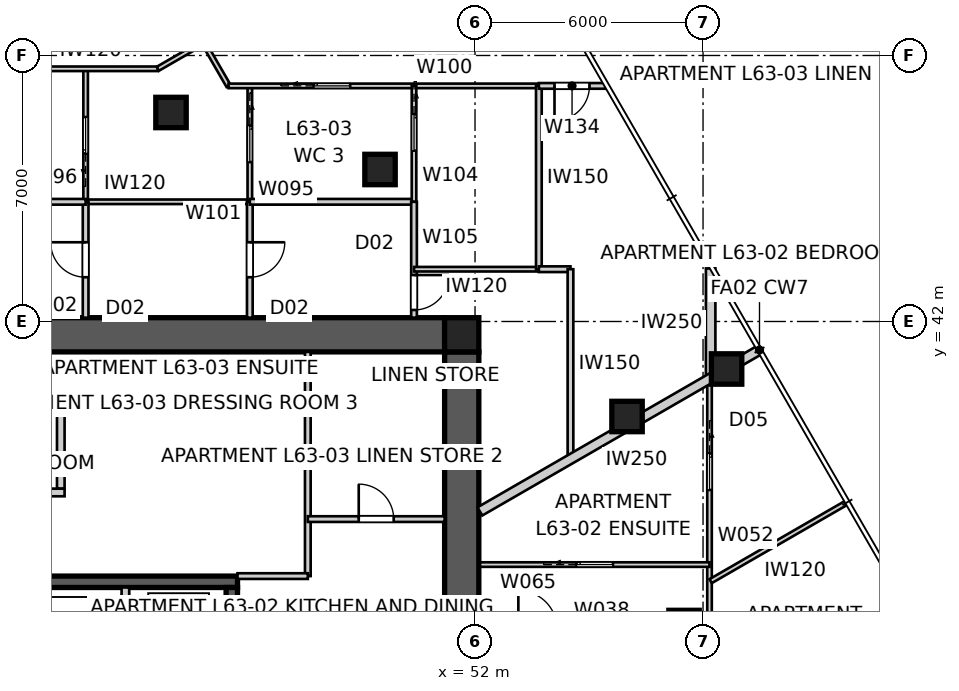
"""IFC4 building model, lengths in metres.
Left out: names, types, materials, properties, quantities, classifications, styles, units other than length and angle.
Written with IfcOpenShell. Run it as: python <this file> out.ifc"""

import sys

from ifc_helpers import new_model, si_unit, direction, frame, frame_2d, origin, origin_2d, place, context, subcontext, project, spatial, polyline, rectangle, outline, extrude, element, fill, save


model = new_model("IFC4")
c1 = context("Model", 3, precision=1e-05, world=origin(), true_north=direction((0.0, 1.0)))
c2 = subcontext(c1, "Body", "Model", "MODEL_VIEW")
j1 = project(units=[si_unit("LENGTHUNIT", "METRE"), si_unit("PLANEANGLEUNIT", "RADIAN")], contexts=[c1])
p1 = place(None, origin())
s1 = spatial("IfcSite", under=j1, at=p1, CompositionType="ELEMENT")
p2 = place(p1, origin())
s2 = spatial("IfcBuilding", under=s1, at=p2, CompositionType="ELEMENT")
p3 = place(p2, frame((0.0, 0.0, 228.6)))
s3 = spatial("IfcBuildingStorey", under=s2, at=p3, CompositionType="ELEMENT", Elevation=228.6)
p4 = place(p3, frame((28.8, 41.65, 0.0), z_axis=(0.0, 0.0, 1.0), x_axis=(1.0, 0.0, 0.0)))
e1 = element("IfcWall", 1, at=p4, inside=s3, PredefinedType="SHEAR", context=c2, shape_type="SweptSolid", body=[
    extrude(outline(polyline([(0.0, -0.45), (22.4, -0.45), (22.4, -0.025), (22.85, -0.025), (22.85, 0.025), (22.4, 0.025), (22.4, 0.45), (0.0, 0.45), (0.0, 0.025), (-0.45, 0.025), (-0.45, -0.025), (0.0, -0.025), (0.0, -0.45)])), origin(), (0.0, 0.0, 1.0), 3.4),
])
p5 = place(p3, frame((51.65, 18.8, 0.0), z_axis=(0.0, 0.0, 1.0), x_axis=(0.0, 1.0, 0.0)))
e2 = element("IfcWall", 2, at=p5, inside=s3, PredefinedType="SHEAR", context=c2, shape_type="SweptSolid", body=[
    extrude(outline(polyline([(0.0, -0.45), (22.4, -0.45), (22.4, -0.025), (22.85, -0.025), (22.85, 0.025), (22.4, 0.025), (22.4, 0.45), (0.0, 0.45), (0.0, 0.025), (-0.45, 0.025), (-0.45, -0.025), (0.0, -0.025), (0.0, -0.45)])), origin(), (0.0, 0.0, 1.0), 3.4),
])
p6 = place(p5, frame((11.14, 0.0, 0.0)))
e3 = element("IfcOpeningElement", 3, at=p6, cuts=e2, PredefinedType="OPENING", context=c2, shape_type="SweptSolid", body=[
    extrude(rectangle(XDim=1.02, YDim=2.4, at=frame_2d((0.51, 1.2))), frame((0.0, 0.46, 0.0), z_axis=(0.0, -1.0, 0.0), x_axis=(1.0, 0.0, 0.0)), (0.0, 0.0, 1.0), 0.92),
])
p7 = place(p3, frame((34.25, 35.15, 0.0), z_axis=(0.0, 0.0, 1.0), x_axis=(1.0, 0.0, 0.0)))
e4 = element("IfcWall", 4, at=p7, inside=s3, PredefinedType="SHEAR", context=c2, shape_type="SweptSolid", body=[
    extrude(rectangle(XDim=11.5, YDim=0.3, at=frame_2d((5.75, 0.0))), origin(), (0.0, 0.0, 1.0), 3.4),
])
p8 = place(p3, frame((42.8, 32.2, 0.0), z_axis=(0.0, 0.0, 1.0), x_axis=(0.0, 1.0, 0.0)))
e5 = element("IfcWall", 5, at=p8, inside=s3, PredefinedType="SOLIDWALL", context=c2, shape_type="SweptSolid", body=[
    extrude(rectangle(XDim=2.8, YDim=0.2, at=frame_2d((1.4, 0.0))), origin(), (0.0, 0.0, 1.0), 3.4),
])
p9 = place(p3, frame((45.6, 32.2, 0.0), z_axis=(0.0, 0.0, 1.0), x_axis=(0.0, 1.0, 0.0)))
e6 = element("IfcWall", 6, at=p9, inside=s3, PredefinedType="SHEAR", context=c2, shape_type="SweptSolid", body=[
    extrude(rectangle(XDim=2.8, YDim=0.3, at=frame_2d((1.4, 0.0))), origin(), (0.0, 0.0, 1.0), 3.4),
])
p10 = place(p3, frame((41.1, 37.6, 0.0), z_axis=(0.0, 0.0, 1.0), x_axis=(0.0, 1.0, 0.0)))
e7 = element("IfcWall", 7, at=p10, inside=s3, PredefinedType="SOLIDWALL", context=c2, shape_type="SweptSolid", body=[
    extrude(rectangle(XDim=2.0, YDim=0.2, at=frame_2d((1.0, 0.0))), origin(), (0.0, 0.0, 1.0), 3.4),
])
for number, where, z_axis, x_axis in (
    (8, (38.8, 37.5, 0.0), (0.0, 0.0, 1.0), (1.0, 0.0, 0.0)),
    (9, (38.8, 39.7, 0.0), (0.0, 0.0, 1.0), (1.0, 0.0, 0.0)),
):
    element("IfcWall", number, at=place(p3, frame(where, z_axis=z_axis, x_axis=x_axis)), inside=s3, PredefinedType="SOLIDWALL", context=c2, shape_type="SweptSolid", body=[
        extrude(rectangle(XDim=2.4, YDim=0.2, at=frame_2d((1.2, 0.0))), origin(), (0.0, 0.0, 1.0), 3.4),
    ])
p11 = place(p3, frame((51.65, 41.65, 0.0), z_axis=(0.0, 0.0, 1.0), x_axis=(1.0, 0.0, 0.0)))
e10 = element("IfcColumn", 10, at=p11, inside=s3, PredefinedType="COLUMN", context=c2, shape_type="SweptSolid", body=[
    extrude(rectangle(XDim=0.9, YDim=0.9, at=origin_2d()), origin(), (0.0, 0.0, 1.0), 3.4),
])
for number, where, z_axis, x_axis in (
    (11, (58.62, 40.75, 0.0), (0.0, 0.0, 1.0), (1.0, 0.0, 0.0)),
    (12, (57.5, 34.0, 0.0), (0.0, 0.0, 1.0), (1.0, 0.0, 0.0)),
    (13, (56.0, 39.5, 0.0), (0.0, 0.0, 1.0), (1.0, 0.0, 0.0)),
    (14, (49.5, 46.0, 0.0), (0.0, 0.0, 1.0), (1.0, 0.0, 0.0)),
    (15, (44.0, 47.5, 0.0), (0.0, 0.0, 1.0), (1.0, 0.0, 0.0)),
):
    element("IfcColumn", number, at=place(p3, frame(where, z_axis=z_axis, x_axis=x_axis)), inside=s3, PredefinedType="COLUMN", context=c2, shape_type="SweptSolid", body=[
        extrude(rectangle(XDim=0.8, YDim=0.8, at=origin_2d()), origin(), (0.0, 0.0, 1.0), 3.4),
    ])
p12 = place(p3, frame((59.486, 41.25, 0.0), z_axis=(0.0, 0.0, 1.0), x_axis=(-0.866020489494, -0.500008511703, 0.0)))
e16 = element("IfcWall", 16, at=p12, inside=s3, PredefinedType="PARTITIONING", context=c2, shape_type="SweptSolid", body=[
    extrude(rectangle(XDim=8.496, YDim=0.25, at=frame_2d((4.248, 0.0))), origin(), (0.0, 0.0, 1.0), 3.25),
])
p13 = place(p3, frame((47.6, 41.2, 0.0), z_axis=(0.0, 0.0, 1.0), x_axis=(0.0, -1.0, 0.0)))
e17 = element("IfcWall", 17, at=p13, inside=s3, PredefinedType="SOLIDWALL", context=c2, shape_type="SweptSolid", body=[
    extrude(rectangle(XDim=5.9, YDim=0.15, at=frame_2d((2.95, 0.0))), origin(), (0.0, 0.0, 1.0), 3.25),
])
p14 = place(p3, frame((47.6, 35.3, 0.0), z_axis=(0.0, 0.0, 1.0), x_axis=(-1.0, 0.0, 0.0)))
e18 = element("IfcWall", 18, at=p14, inside=s3, PredefinedType="SOLIDWALL", context=c2, shape_type="SweptSolid", body=[
    extrude(rectangle(XDim=1.85, YDim=0.15, at=frame_2d((0.925, 0.0))), origin(), (0.0, 0.0, 1.0), 3.25),
])
p15 = place(p3, frame((47.6, 36.8, 0.0), z_axis=(0.0, 0.0, 1.0), x_axis=(1.0, 0.0, 0.0)))
e19 = element("IfcWall", 19, at=p15, inside=s3, PredefinedType="SOLIDWALL", context=c2, shape_type="SweptSolid", body=[
    extrude(rectangle(XDim=3.6, YDim=0.15, at=frame_2d((1.8, 0.0))), origin(), (0.0, 0.0, 1.0), 3.25),
])
p16 = place(p15, frame((1.34, 0.0, 0.0)))
e20 = element("IfcOpeningElement", 20, at=p16, cuts=e19, PredefinedType="OPENING", context=c2, shape_type="SweptSolid", body=[
    extrude(rectangle(XDim=0.92, YDim=2.1, at=frame_2d((0.46, 1.05))), frame((0.0, 0.085, 0.0), z_axis=(0.0, -1.0, 0.0), x_axis=(1.0, 0.0, 0.0)), (0.0, 0.0, 1.0), 0.17),
])
p17 = place(p3, frame((58.171, 40.491, 0.0), z_axis=(0.0, 0.0, 1.0), x_axis=(-5.1455328e-05, -0.999999998676, 0.0)))
e21 = element("IfcWall", 21, at=p17, inside=s3, PredefinedType="PARTITIONING", context=c2, shape_type="SweptSolid", body=[
    extrude(rectangle(XDim=14.234, YDim=0.12, at=frame_2d((7.117, 0.0))), origin(), (0.0, 0.0, 1.0), 3.25),
])
p18 = place(p17, frame((6.932, 0.0, 0.0)))
e22 = element("IfcOpeningElement", 22, at=p18, cuts=e21, PredefinedType="OPENING", context=c2, shape_type="SweptSolid", body=[
    extrude(rectangle(XDim=0.92, YDim=2.34, at=frame_2d((0.46, 1.17))), frame((0.0, 0.07, 0.0), z_axis=(0.0, -1.0, 0.0), x_axis=(1.0, 0.0, 0.0)), (0.0, 0.0, 1.0), 0.14),
])
p19 = place(p17, frame((11.829, 0.0, 0.0)))
e23 = element("IfcOpeningElement", 23, at=p19, cuts=e21, PredefinedType="OPENING", context=c2, shape_type="SweptSolid", body=[
    extrude(rectangle(XDim=0.96, YDim=2.1, at=frame_2d((0.48, 1.05))), frame((0.0, 0.07, 0.0), z_axis=(0.0, -1.0, 0.0), x_axis=(1.0, 0.0, 0.0)), (0.0, 0.0, 1.0), 0.14),
])
p20 = place(p17, frame((1.964, 0.0, 0.0)))
e24 = element("IfcOpeningElement", 24, at=p20, cuts=e21, PredefinedType="OPENING", context=c2, shape_type="SweptSolid", body=[
    extrude(rectangle(XDim=0.96, YDim=2.1, at=frame_2d((0.48, 1.05))), frame((0.0, 0.07, 0.0), z_axis=(0.0, -1.0, 0.0), x_axis=(1.0, 0.0, 0.0)), (0.0, 0.0, 1.0), 0.14),
])
p21 = place(p3, frame((52.13, 35.603, 0.0), z_axis=(0.0, 0.0, 1.0), x_axis=(1.0, 0.0, 0.0)))
e25 = element("IfcWall", 25, at=p21, inside=s3, PredefinedType="PARTITIONING", context=c2, shape_type="SweptSolid", body=[
    extrude(rectangle(XDim=6.04, YDim=0.12, at=frame_2d((3.02, 0.0))), origin(), (0.0, 0.0, 1.0), 3.25),
])
p22 = place(p21, frame((2.54, 0.0, 0.0)))
e26 = element("IfcOpeningElement", 26, at=p22, cuts=e25, PredefinedType="OPENING", context=c2, shape_type="SweptSolid", body=[
    extrude(rectangle(XDim=0.96, YDim=2.1, at=frame_2d((0.48, 1.05))), frame((0.0, 0.07, 0.0), z_axis=(0.0, -1.0, 0.0), x_axis=(1.0, 0.0, 0.0)), (0.0, 0.0, 1.0), 0.14),
])
p23 = place(p3, frame((58.2, 35.167, 0.0), z_axis=(0.0, 0.0, 1.0), x_axis=(0.866025520146, 0.499999798456, 0.0)))
e27 = element("IfcWall", 27, at=p23, inside=s3, PredefinedType="PARTITIONING", context=c2, shape_type="SweptSolid", body=[
    extrude(rectangle(XDim=4.115, YDim=0.12, at=frame_2d((2.057, 0.0))), origin(), (0.0, 0.0, 1.0), 3.25),
])
p24 = place(p3, frame((58.2, 40.525, 0.0), z_axis=(0.0, 0.0, 1.0), x_axis=(0.0, 1.0, 0.0)))
e28 = element("IfcWall", 28, at=p24, inside=s3, PredefinedType="PARTITIONING", context=c2, shape_type="SweptSolid", body=[
    extrude(rectangle(XDim=2.872, YDim=0.25, at=frame_2d((1.436, 0.0))), origin(), (0.0, 0.0, 1.0), 3.25),
])
p25 = place(p3, frame((46.074, 45.15, 0.0), z_axis=(0.0, 0.0, 1.0), x_axis=(-1.0, 0.0, 0.0)))
e29 = element("IfcWall", 29, at=p25, inside=s3, PredefinedType="PARTITIONING", context=c2, shape_type="SweptSolid", body=[
    extrude(rectangle(XDim=4.321, YDim=0.12, at=frame_2d((2.16, 0.0))), origin(), (0.0, 0.0, 1.0), 3.25),
])
p26 = place(p3, frame((46.074, 48.2, 0.0), z_axis=(0.0, 0.0, 1.0), x_axis=(0.0, -1.0, 0.0)))
e30 = element("IfcWall", 30, at=p26, inside=s3, PredefinedType="PARTITIONING", context=c2, shape_type="SweptSolid", body=[
    extrude(rectangle(XDim=3.05, YDim=0.12, at=frame_2d((1.525, 0.0))), origin(), (0.0, 0.0, 1.0), 3.25),
])
p27 = place(p26, frame((1.045, 0.0, 0.0)))
e31 = element("IfcOpeningElement", 31, at=p27, cuts=e30, PredefinedType="OPENING", context=c2, shape_type="SweptSolid", body=[
    extrude(rectangle(XDim=0.96, YDim=2.1, at=frame_2d((0.48, 1.05))), frame((0.0, 0.07, 0.0), z_axis=(0.0, -1.0, 0.0), x_axis=(1.0, 0.0, 0.0)), (0.0, 0.0, 1.0), 0.14),
])
p28 = place(p3, frame((41.753, 45.15, 0.0), z_axis=(0.0, 0.0, 1.0), x_axis=(0.0, 1.0, 0.0)))
e32 = element("IfcWall", 32, at=p28, inside=s3, PredefinedType="PARTITIONING", context=c2, shape_type="SweptSolid", body=[
    extrude(rectangle(XDim=3.5, YDim=0.12, at=frame_2d((1.75, 0.0))), origin(), (0.0, 0.0, 1.0), 3.25),
])
p29 = place(p28, frame((1.27, 0.0, 0.0)))
e33 = element("IfcOpeningElement", 33, at=p29, cuts=e32, PredefinedType="OPENING", context=c2, shape_type="SweptSolid", body=[
    extrude(rectangle(XDim=0.96, YDim=2.1, at=frame_2d((0.48, 1.05))), frame((0.0, 0.07, 0.0), z_axis=(0.0, -1.0, 0.0), x_axis=(1.0, 0.0, 0.0)), (0.0, 0.0, 1.0), 0.14),
])
p30 = place(p3, frame((40.123, 48.65, 0.0), z_axis=(0.0, 0.0, 1.0), x_axis=(1.0, 0.0, 0.0)))
e34 = element("IfcWall", 34, at=p30, inside=s3, PredefinedType="PARTITIONING", context=c2, shape_type="SweptSolid", body=[
    extrude(rectangle(XDim=3.53, YDim=0.12, at=frame_2d((1.765, 0.0))), origin(), (0.0, 0.0, 1.0), 3.25),
])
p31 = place(p3, frame((43.653, 48.65, 0.0), z_axis=(0.0, 0.0, 1.0), x_axis=(0.865980246016, 0.500078207394, 0.0)))
e35 = element("IfcWall", 35, at=p31, inside=s3, PredefinedType="PARTITIONING", context=c2, shape_type="SweptSolid", body=[
    extrude(rectangle(XDim=1.346, YDim=0.12, at=frame_2d((0.673, 0.0))), origin(), (0.0, 0.0, 1.0), 3.25),
])
p32 = place(p3, frame((40.786, 56.388, 0.0), z_axis=(0.0, 0.0, 1.0), x_axis=(0.49999364752, -0.86602907136, 0.0)))
e36 = element("IfcWall", 36, at=p32, inside=s3, PredefinedType="PARTITIONING", context=c2, shape_type="SweptSolid", body=[
    extrude(rectangle(XDim=9.455, YDim=0.12, at=frame_2d((4.728, 0.0))), origin(), (0.0, 0.0, 1.0), 3.25),
])
p33 = place(p32, frame((1.681, 0.0, 0.0)))
e37 = element("IfcOpeningElement", 37, at=p33, cuts=e36, PredefinedType="OPENING", context=c2, shape_type="SweptSolid", body=[
    extrude(rectangle(XDim=0.92, YDim=2.34, at=frame_2d((0.46, 1.17))), frame((0.0, 0.07, 0.0), z_axis=(0.0, -1.0, 0.0), x_axis=(1.0, 0.0, 0.0)), (0.0, 0.0, 1.0), 0.14),
])
p34 = place(p32, frame((5.726, 0.0, 0.0)))
e38 = element("IfcOpeningElement", 38, at=p34, cuts=e36, PredefinedType="OPENING", context=c2, shape_type="SweptSolid", body=[
    extrude(rectangle(XDim=0.92, YDim=2.34, at=frame_2d((0.46, 1.17))), frame((0.0, 0.07, 0.0), z_axis=(0.0, -1.0, 0.0), x_axis=(1.0, 0.0, 0.0)), (0.0, 0.0, 1.0), 0.14),
])
p35 = place(p3, frame((45.514, 48.2, 0.0), z_axis=(0.0, 0.0, 1.0), x_axis=(1.0, 0.0, 0.0)))
e39 = element("IfcWall", 39, at=p35, inside=s3, PredefinedType="PARTITIONING", context=c2, shape_type="SweptSolid", body=[
    extrude(rectangle(XDim=8.166, YDim=0.12, at=frame_2d((4.083, 0.0))), origin(), (0.0, 0.0, 1.0), 3.25),
])
p36 = place(p35, frame((2.241, 0.0, 0.0)))
e40 = element("IfcOpeningElement", 40, at=p36, cuts=e39, PredefinedType="OPENING", context=c2, shape_type="SweptSolid", body=[
    extrude(rectangle(XDim=0.96, YDim=2.1, at=frame_2d((0.48, 1.05))), frame((0.0, 0.07, 0.0), z_axis=(0.0, -1.0, 0.0), x_axis=(1.0, 0.0, 0.0)), (0.0, 0.0, 1.0), 0.14),
])
p37 = place(p3, frame((46.074, 45.15, 0.0), z_axis=(0.0, 0.0, 1.0), x_axis=(0.0, -1.0, 0.0)))
e41 = element("IfcWall", 41, at=p37, inside=s3, PredefinedType="SOLIDWALL", context=c2, shape_type="SweptSolid", body=[
    extrude(rectangle(XDim=3.05, YDim=0.15, at=frame_2d((1.525, 0.0))), origin(), (0.0, 0.0, 1.0), 3.25),
])
p38 = place(p37, frame((1.065, 0.0, 0.0)))
e42 = element("IfcOpeningElement", 42, at=p38, cuts=e41, PredefinedType="OPENING", context=c2, shape_type="SweptSolid", body=[
    extrude(rectangle(XDim=0.92, YDim=2.34, at=frame_2d((0.46, 1.17))), frame((0.0, 0.085, 0.0), z_axis=(0.0, -1.0, 0.0), x_axis=(1.0, 0.0, 0.0)), (0.0, 0.0, 1.0), 0.17),
])
p39 = place(p3, frame((41.753, 42.1, 0.0), z_axis=(0.0, 0.0, 1.0), x_axis=(0.0, 1.0, 0.0)))
e43 = element("IfcWall", 43, at=p39, inside=s3, PredefinedType="SOLIDWALL", context=c2, shape_type="SweptSolid", body=[
    extrude(rectangle(XDim=3.05, YDim=0.15, at=frame_2d((1.525, 0.0))), origin(), (0.0, 0.0, 1.0), 3.25),
])
p40 = place(p39, frame((1.065, 0.0, 0.0)))
e44 = element("IfcOpeningElement", 44, at=p40, cuts=e43, PredefinedType="OPENING", context=c2, shape_type="SweptSolid", body=[
    extrude(rectangle(XDim=0.92, YDim=2.34, at=frame_2d((0.46, 1.17))), frame((0.0, 0.085, 0.0), z_axis=(0.0, -1.0, 0.0), x_axis=(1.0, 0.0, 0.0)), (0.0, 0.0, 1.0), 0.17),
])
p41 = place(p3, frame((50.395, 45.15, 0.0), z_axis=(0.0, 0.0, 1.0), x_axis=(-1.0, 0.0, 0.0)))
e45 = element("IfcWall", 45, at=p41, inside=s3, PredefinedType="SOLIDWALL", context=c2, shape_type="SweptSolid", body=[
    extrude(rectangle(XDim=4.321, YDim=0.15, at=frame_2d((2.16, 0.0))), origin(), (0.0, 0.0, 1.0), 3.25),
])
p42 = place(p3, frame((50.395, 48.2, 0.0), z_axis=(0.0, 0.0, 1.0), x_axis=(0.0, -1.0, 0.0)))
e46 = element("IfcWall", 46, at=p42, inside=s3, PredefinedType="PARTITIONING", context=c2, shape_type="SweptSolid", body=[
    extrude(rectangle(XDim=3.05, YDim=0.12, at=frame_2d((1.525, 0.0))), origin(), (0.0, 0.0, 1.0), 3.25),
])
p43 = place(p42, frame((0.745, 0.0, 0.0)))
e47 = element("IfcOpeningElement", 47, at=p43, cuts=e46, PredefinedType="OPENING", context=c2, shape_type="SweptSolid", body=[
    extrude(rectangle(XDim=0.96, YDim=2.1, at=frame_2d((0.48, 1.05))), frame((0.0, 0.07, 0.0), z_axis=(0.0, -1.0, 0.0), x_axis=(1.0, 0.0, 0.0)), (0.0, 0.0, 1.0), 0.14),
])
p44 = place(p3, frame((50.395, 45.15, 0.0), z_axis=(0.0, 0.0, 1.0), x_axis=(0.0, -1.0, 0.0)))
e48 = element("IfcWall", 48, at=p44, inside=s3, PredefinedType="SOLIDWALL", context=c2, shape_type="SweptSolid", body=[
    extrude(rectangle(XDim=3.05, YDim=0.15, at=frame_2d((1.525, 0.0))), origin(), (0.0, 0.0, 1.0), 3.25),
])
p45 = place(p44, frame((1.927, 0.0, 0.0)))
e49 = element("IfcOpeningElement", 49, at=p45, cuts=e48, PredefinedType="OPENING", context=c2, shape_type="SweptSolid", body=[
    extrude(rectangle(XDim=0.92, YDim=2.34, at=frame_2d((0.46, 1.17))), frame((0.0, 0.085, 0.0), z_axis=(0.0, -1.0, 0.0), x_axis=(1.0, 0.0, 0.0)), (0.0, 0.0, 1.0), 0.17),
])
p46 = place(p3, frame((53.68, 43.376, 0.0), z_axis=(0.0, 0.0, 1.0), x_axis=(-1.0, 0.0, 0.0)))
e50 = element("IfcWall", 50, at=p46, inside=s3, PredefinedType="PARTITIONING", context=c2, shape_type="SweptSolid", body=[
    extrude(rectangle(XDim=3.285, YDim=0.12, at=frame_2d((1.643, 0.0))), origin(), (0.0, 0.0, 1.0), 3.25),
])
p47 = place(p3, frame((53.68, 48.2, 0.0), z_axis=(0.0, 0.0, 1.0), x_axis=(0.0, -1.0, 0.0)))
e51 = element("IfcWall", 51, at=p47, inside=s3, PredefinedType="SOLIDWALL", context=c2, shape_type="SweptSolid", body=[
    extrude(rectangle(XDim=4.824, YDim=0.15, at=frame_2d((2.412, 0.0))), origin(), (0.0, 0.0, 1.0), 3.25),
])
p48 = place(p3, frame((53.68, 43.376, 0.0), z_axis=(0.0, 0.0, 1.0), x_axis=(1.0, 0.0, 0.0)))
e52 = element("IfcWall", 52, at=p48, inside=s3, PredefinedType="SOLIDWALL", context=c2, shape_type="SweptSolid", body=[
    extrude(rectangle(XDim=0.832, YDim=0.15, at=frame_2d((0.416, 0.0))), origin(), (0.0, 0.0, 1.0), 3.25),
])
p49 = place(p3, frame((54.512, 43.376, 0.0), z_axis=(0.0, 0.0, 1.0), x_axis=(0.0, -1.0, 0.0)))
e53 = element("IfcWall", 53, at=p49, inside=s3, PredefinedType="SOLIDWALL", context=c2, shape_type="SweptSolid", body=[
    extrude(rectangle(XDim=4.998, YDim=0.15, at=frame_2d((2.499, 0.0))), origin(), (0.0, 0.0, 1.0), 3.25),
])
p50 = place(p3, frame((41.753, 45.15, 0.0), z_axis=(0.0, 0.0, 1.0), x_axis=(-1.0, 0.0, 0.0)))
e54 = element("IfcWall", 54, at=p50, inside=s3, PredefinedType="SOLIDWALL", context=c2, shape_type="SweptSolid", body=[
    extrude(rectangle(XDim=10.751, YDim=0.15, at=frame_2d((5.375, 0.0))), origin(), (0.0, 0.0, 1.0), 3.25),
])
p51 = place(p3, frame((55.427, 48.2, 0.0), z_axis=(0.0, 0.0, 1.0), x_axis=(-1.0, 0.0, 0.0)))
e55 = element("IfcWall", 55, at=p51, inside=s3, PredefinedType="SOLIDWALL", context=c2, shape_type="SweptSolid", body=[
    extrude(rectangle(XDim=1.747, YDim=0.15, at=frame_2d((0.874, 0.0))), origin(), (0.0, 0.0, 1.0), 3.25),
])
p52 = place(p51, frame((0.416, 0.0, 0.0)))
e56 = element("IfcOpeningElement", 56, at=p52, cuts=e55, PredefinedType="OPENING", context=c2, shape_type="SweptSolid", body=[
    extrude(rectangle(XDim=0.92, YDim=2.1, at=frame_2d((0.46, 1.05))), frame((0.0, 0.085, 0.0), z_axis=(0.0, -1.0, 0.0), x_axis=(1.0, 0.0, 0.0)), (0.0, 0.0, 1.0), 0.17),
])
p53 = place(p16, origin())
e57 = element("IfcDoor", 57, at=p53, inside=s3, OperationType="SINGLE_SWING_LEFT", PredefinedType="DOOR", context=c2, shape_type="SweptSolid", body=[
    extrude(rectangle(XDim=0.92, YDim=2.1, at=frame_2d((0.46, 1.05))), frame((0.0, 0.025, 0.0), z_axis=(0.0, -1.0, 0.0), x_axis=(1.0, 0.0, 0.0)), (0.0, 0.0, 1.0), 0.05),
])
fill(e20, e57)
p54 = place(p22, origin())
e58 = element("IfcDoor", 58, at=p54, inside=s3, OperationType="SLIDING_TO_LEFT", PredefinedType="DOOR", context=c2, shape_type="SweptSolid", body=[
    extrude(rectangle(XDim=0.96, YDim=2.1, at=frame_2d((0.48, 1.05))), frame((0.0, 0.025, 0.0), z_axis=(0.0, -1.0, 0.0), x_axis=(1.0, 0.0, 0.0)), (0.0, 0.0, 1.0), 0.05),
])
fill(e26, e58)
p55 = place(p20, origin())
e59 = element("IfcDoor", 59, at=p55, inside=s3, OperationType="SLIDING_TO_LEFT", PredefinedType="DOOR", context=c2, shape_type="SweptSolid", body=[
    extrude(rectangle(XDim=0.96, YDim=2.1, at=frame_2d((0.48, 1.05))), frame((0.0, 0.025, 0.0), z_axis=(0.0, -1.0, 0.0), x_axis=(1.0, 0.0, 0.0)), (0.0, 0.0, 1.0), 0.05),
])
fill(e24, e59)
p56 = place(p29, origin())
e60 = element("IfcDoor", 60, at=p56, inside=s3, OperationType="SLIDING_TO_LEFT", PredefinedType="DOOR", context=c2, shape_type="SweptSolid", body=[
    extrude(rectangle(XDim=0.96, YDim=2.1, at=frame_2d((0.48, 1.05))), frame((0.0, 0.025, 0.0), z_axis=(0.0, -1.0, 0.0), x_axis=(1.0, 0.0, 0.0)), (0.0, 0.0, 1.0), 0.05),
])
fill(e33, e60)
p57 = place(p40, origin())
e61 = element("IfcDoor", 61, at=p57, inside=s3, OperationType="SINGLE_SWING_RIGHT", PredefinedType="DOOR", context=c2, shape_type="SweptSolid", body=[
    extrude(rectangle(XDim=0.92, YDim=2.34, at=frame_2d((0.46, 1.17))), frame((0.0, 0.025, 0.0), z_axis=(0.0, -1.0, 0.0), x_axis=(1.0, 0.0, 0.0)), (0.0, 0.0, 1.0), 0.05),
])
fill(e44, e61)
p58 = place(p27, origin())
e62 = element("IfcDoor", 62, at=p58, inside=s3, OperationType="SLIDING_TO_LEFT", PredefinedType="DOOR", context=c2, shape_type="SweptSolid", body=[
    extrude(rectangle(XDim=0.96, YDim=2.1, at=frame_2d((0.48, 1.05))), frame((0.0, 0.025, 0.0), z_axis=(0.0, -1.0, 0.0), x_axis=(1.0, 0.0, 0.0)), (0.0, 0.0, 1.0), 0.05),
])
fill(e31, e62)
p59 = place(p38, origin())
e63 = element("IfcDoor", 63, at=p59, inside=s3, OperationType="SINGLE_SWING_LEFT", PredefinedType="DOOR", context=c2, shape_type="SweptSolid", body=[
    extrude(rectangle(XDim=0.92, YDim=2.34, at=frame_2d((0.46, 1.17))), frame((0.0, 0.025, 0.0), z_axis=(0.0, -1.0, 0.0), x_axis=(1.0, 0.0, 0.0)), (0.0, 0.0, 1.0), 0.05),
])
fill(e42, e63)
p60 = place(p36, origin())
e64 = element("IfcDoor", 64, at=p60, inside=s3, OperationType="SLIDING_TO_LEFT", PredefinedType="DOOR", context=c2, shape_type="SweptSolid", body=[
    extrude(rectangle(XDim=0.96, YDim=2.1, at=frame_2d((0.48, 1.05))), frame((0.0, 0.025, 0.0), z_axis=(0.0, -1.0, 0.0), x_axis=(1.0, 0.0, 0.0)), (0.0, 0.0, 1.0), 0.05),
])
fill(e40, e64)
p61 = place(p43, origin())
e65 = element("IfcDoor", 65, at=p61, inside=s3, OperationType="SLIDING_TO_LEFT", PredefinedType="DOOR", context=c2, shape_type="SweptSolid", body=[
    extrude(rectangle(XDim=0.96, YDim=2.1, at=frame_2d((0.48, 1.05))), frame((0.0, 0.025, 0.0), z_axis=(0.0, -1.0, 0.0), x_axis=(1.0, 0.0, 0.0)), (0.0, 0.0, 1.0), 0.05),
])
fill(e47, e65)
p62 = place(p45, origin())
e66 = element("IfcDoor", 66, at=p62, inside=s3, OperationType="SINGLE_SWING_LEFT", PredefinedType="DOOR", context=c2, shape_type="SweptSolid", body=[
    extrude(rectangle(XDim=0.92, YDim=2.34, at=frame_2d((0.46, 1.17))), frame((0.0, 0.025, 0.0), z_axis=(0.0, -1.0, 0.0), x_axis=(1.0, 0.0, 0.0)), (0.0, 0.0, 1.0), 0.05),
])
fill(e49, e66)
p63 = place(p52, origin())
e67 = element("IfcDoor", 67, at=p63, inside=s3, OperationType="SINGLE_SWING_RIGHT", PredefinedType="DOOR", context=c2, shape_type="SweptSolid", body=[
    extrude(rectangle(XDim=0.92, YDim=2.1, at=frame_2d((0.46, 1.05))), frame((0.0, 0.025, 0.0), z_axis=(0.0, -1.0, 0.0), x_axis=(1.0, 0.0, 0.0)), (0.0, 0.0, 1.0), 0.05),
])
fill(e56, e67)
save(model, sys.argv[1])
